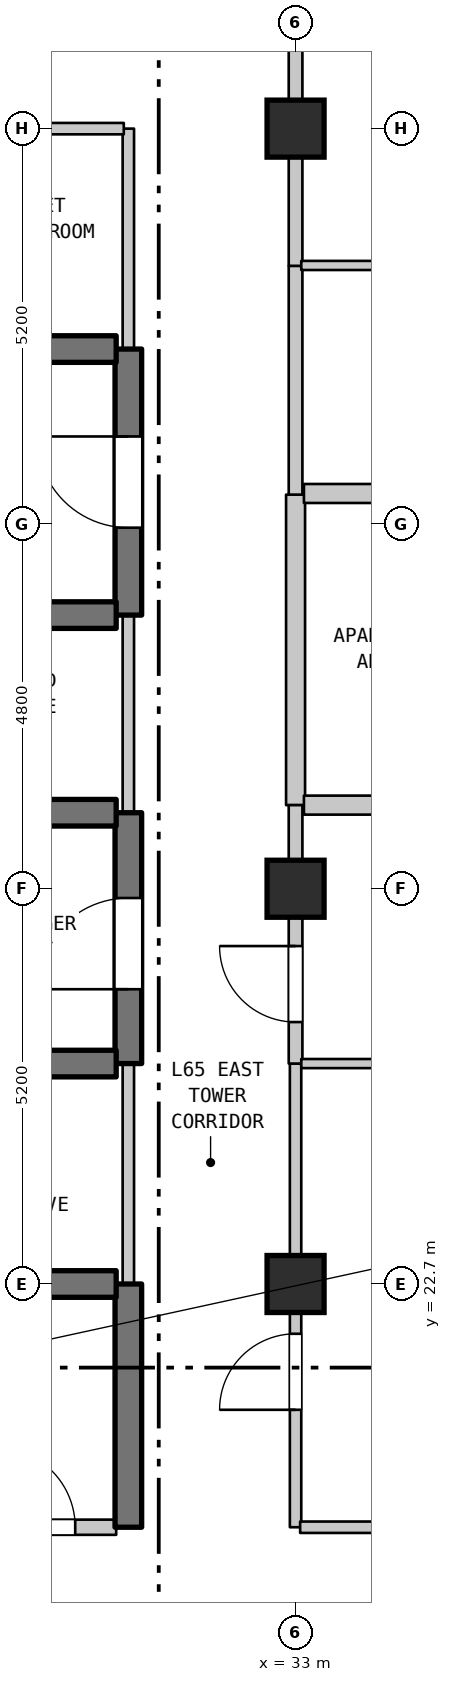
"""IFC4 building model, lengths in metres.
Left out: names, types, materials, properties, quantities, classifications, styles, units other than length and angle.
Written with IfcOpenShell. Run it as: python <this file> out.ifc"""

import sys

from ifc_helpers import new_model, si_unit, direction, frame, frame_2d, origin, origin_2d, place, context, subcontext, project, spatial, rectangle, extrude, element, fill, save


model = new_model("IFC4")
c1 = context("Model", 3, precision=1e-05, world=origin(), true_north=direction((0.0, 1.0)))
c2 = subcontext(c1, "Body", "Model", "MODEL_VIEW")
j1 = project(units=[si_unit("LENGTHUNIT", "METRE"), si_unit("PLANEANGLEUNIT", "RADIAN")], contexts=[c1])
p1 = place(None, origin())
s1 = spatial("IfcSite", under=j1, at=p1, CompositionType="ELEMENT")
p2 = place(p1, origin())
s2 = spatial("IfcBuilding", under=s1, at=p2, CompositionType="ELEMENT")
p3 = place(p2, frame((0.0, 0.0, 262.1)))
s3 = spatial("IfcBuildingStorey", under=s2, at=p3, CompositionType="ELEMENT", Elevation=262.1)
for number, where, z_axis, x_axis in (
    (1, (33.0, 22.7, 0.0), (0.0, 0.0, 1.0), (1.0, 0.0, 0.0)),
    (2, (33.0, 27.9, 0.0), (0.0, 0.0, 1.0), (1.0, 0.0, 0.0)),
    (3, (33.0, 37.9, 0.0), (0.0, 0.0, 1.0), (1.0, 0.0, 0.0)),
):
    element("IfcColumn", number, at=place(p3, frame(where, z_axis=z_axis, x_axis=x_axis)), inside=s3, PredefinedType="COLUMN", context=c2, shape_type="SweptSolid", body=[
        extrude(rectangle(XDim=0.75, YDim=0.75, at=origin_2d()), origin(), (0.0, 0.0, 1.0), 3.7),
    ])
p4 = place(p3, frame((30.8, 19.5, 0.0), z_axis=(0.0, 0.0, 1.0), x_axis=(0.0, 1.0, 0.0)))
e4 = element("IfcWall", 4, at=p4, inside=s3, PredefinedType="SHEAR", context=c2, shape_type="SweptSolid", body=[
    extrude(rectangle(XDim=3.2, YDim=0.35, at=frame_2d((1.6, 0.0))), origin(), (0.0, 0.0, 1.0), 3.39),
])
p5 = place(p3, frame((30.8, 22.7, 0.0), z_axis=(0.0, 0.0, 1.0), x_axis=(0.0, 1.0, 0.0)))
e5 = element("IfcWall", 5, at=p5, inside=s3, PredefinedType="STANDARD", context=c2, shape_type="SweptSolid", body=[
    extrude(rectangle(XDim=2.9, YDim=0.15, at=frame_2d((1.45, 0.0))), origin(), (0.0, 0.0, 1.0), 3.39),
])
p6 = place(p3, frame((30.8, 25.6, 0.0), z_axis=(0.0, 0.0, 1.0), x_axis=(0.0, 1.0, 0.0)))
e6 = element("IfcWall", 6, at=p6, inside=s3, PredefinedType="SHEAR", context=c2, shape_type="SweptSolid", body=[
    extrude(rectangle(XDim=3.3, YDim=0.35, at=frame_2d((1.65, 0.0))), origin(), (0.0, 0.0, 1.0), 3.39),
])
p7 = place(p6, frame((0.978, 0.0, 0.0)))
e7 = element("IfcOpeningElement", 7, at=p7, cuts=e6, PredefinedType="OPENING", context=c2, shape_type="SweptSolid", body=[
    extrude(rectangle(XDim=1.2, YDim=2.2, at=frame_2d((0.6, 1.1))), frame((0.0, 0.185, 0.0), z_axis=(0.0, -1.0, 0.0), x_axis=(1.0, 0.0, 0.0)), (0.0, 0.0, 1.0), 0.37),
])
p8 = place(p3, frame((30.8, 28.9, 0.0), z_axis=(0.0, 0.0, 1.0), x_axis=(0.0, 1.0, 0.0)))
e8 = element("IfcWall", 8, at=p8, inside=s3, PredefinedType="STANDARD", context=c2, shape_type="SweptSolid", body=[
    extrude(rectangle(XDim=2.6, YDim=0.15, at=frame_2d((1.3, 0.0))), origin(), (0.0, 0.0, 1.0), 3.39),
])
p9 = place(p3, frame((30.8, 31.5, 0.0), z_axis=(0.0, 0.0, 1.0), x_axis=(0.0, 1.0, 0.0)))
e9 = element("IfcWall", 9, at=p9, inside=s3, PredefinedType="SHEAR", context=c2, shape_type="SweptSolid", body=[
    extrude(rectangle(XDim=3.5, YDim=0.35, at=frame_2d((1.75, 0.0))), origin(), (0.0, 0.0, 1.0), 3.39),
])
p10 = place(p9, frame((1.15, 0.0, 0.0)))
e10 = element("IfcOpeningElement", 10, at=p10, cuts=e9, PredefinedType="OPENING", context=c2, shape_type="SweptSolid", body=[
    extrude(rectangle(XDim=1.2, YDim=2.2, at=frame_2d((0.6, 1.1))), frame((0.0, 0.185, 0.0), z_axis=(0.0, -1.0, 0.0), x_axis=(1.0, 0.0, 0.0)), (0.0, 0.0, 1.0), 0.37),
])
p11 = place(p3, frame((30.8, 35.0, 0.0), z_axis=(0.0, 0.0, 1.0), x_axis=(0.0, 1.0, 0.0)))
e11 = element("IfcWall", 11, at=p11, inside=s3, PredefinedType="STANDARD", context=c2, shape_type="SweptSolid", body=[
    extrude(rectangle(XDim=2.9, YDim=0.15, at=frame_2d((1.45, 0.0))), origin(), (0.0, 0.0, 1.0), 3.39),
])
p12 = place(p3, frame((33.0, 19.5, 0.0), z_axis=(0.0, 0.0, 1.0), x_axis=(0.0, 1.0, 0.0)))
e12 = element("IfcWall", 12, at=p12, inside=s3, PredefinedType="STANDARD", context=c2, shape_type="SweptSolid", body=[
    extrude(rectangle(XDim=6.1, YDim=0.15, at=frame_2d((3.05, 0.0))), origin(), (0.0, 0.0, 1.0), 3.1),
])
p13 = place(p12, frame((1.545, 0.0, 0.0)))
e13 = element("IfcOpeningElement", 13, at=p13, cuts=e12, PredefinedType="OPENING", context=c2, shape_type="SweptSolid", body=[
    extrude(rectangle(XDim=1.0, YDim=2.15, at=frame_2d((0.5, 1.075))), frame((0.0, 0.085, 0.0), z_axis=(0.0, -1.0, 0.0), x_axis=(1.0, 0.0, 0.0)), (0.0, 0.0, 1.0), 0.17),
])
p14 = place(p3, frame((33.0, 25.6, 0.0), z_axis=(0.0, 0.0, 1.0), x_axis=(0.0, 1.0, 0.0)))
e14 = element("IfcWall", 14, at=p14, inside=s3, PredefinedType="STANDARD", context=c2, shape_type="SweptSolid", body=[
    extrude(rectangle(XDim=2.3, YDim=0.18, at=frame_2d((1.15, 0.0))), origin(), (0.0, 0.0, 1.0), 3.1),
])
p15 = place(p14, frame((0.546, 0.0, 0.0)))
e15 = element("IfcOpeningElement", 15, at=p15, cuts=e14, PredefinedType="OPENING", context=c2, shape_type="SweptSolid", body=[
    extrude(rectangle(XDim=1.0, YDim=2.15, at=frame_2d((0.5, 1.075))), frame((0.0, 0.1, 0.0), z_axis=(0.0, -1.0, 0.0), x_axis=(1.0, 0.0, 0.0)), (0.0, 0.0, 1.0), 0.2),
])
p16 = place(p3, frame((33.0, 29.0, 0.0), z_axis=(0.0, 0.0, 1.0), x_axis=(0.0, 1.0, 0.0)))
e16 = element("IfcWall", 16, at=p16, inside=s3, PredefinedType="STANDARD", context=c2, shape_type="SweptSolid", body=[
    extrude(rectangle(XDim=4.085, YDim=0.25, at=frame_2d((2.042, 0.0))), origin(), (0.0, 0.0, 1.0), 2.89),
])
p17 = place(p3, frame((33.0, 33.085, 0.0), z_axis=(0.0, 0.0, 1.0), x_axis=(0.0, 1.0, 0.0)))
e17 = element("IfcWall", 17, at=p17, inside=s3, PredefinedType="STANDARD", context=c2, shape_type="SweptSolid", body=[
    extrude(rectangle(XDim=3.01, YDim=0.18, at=frame_2d((1.505, 0.0))), origin(), (0.0, 0.0, 1.0), 2.89),
])
p18 = place(p3, frame((33.0, 36.095, 0.0), z_axis=(0.0, 0.0, 1.0), x_axis=(0.0, 1.0, 0.0)))
e18 = element("IfcWall", 18, at=p18, inside=s3, PredefinedType="STANDARD", context=c2, shape_type="SweptSolid", body=[
    extrude(rectangle(XDim=1.805, YDim=0.18, at=frame_2d((0.902, 0.0))), origin(), (0.0, 0.0, 1.0), 2.89),
])
p19 = place(p3, frame((28.585, 19.5, 0.0), z_axis=(0.0, 0.0, 1.0), x_axis=(1.0, 0.0, 0.0)))
e19 = element("IfcWall", 19, at=p19, inside=s3, PredefinedType="STANDARD", context=c2, shape_type="SweptSolid", body=[
    extrude(rectangle(XDim=2.055, YDim=0.2, at=frame_2d((1.027, 0.0))), origin(), (0.0, 0.0, 1.0), 3.39),
])
p20 = place(p19, frame((0.466, 0.0, 0.0)))
e20 = element("IfcOpeningElement", 20, at=p20, cuts=e19, PredefinedType="OPENING", context=c2, shape_type="SweptSolid", body=[
    extrude(rectangle(XDim=1.05, YDim=2.15, at=frame_2d((0.525, 1.075))), frame((0.0, 0.11, 0.0), z_axis=(0.0, -1.0, 0.0), x_axis=(1.0, 0.0, 0.0)), (0.0, 0.0, 1.0), 0.22),
])
p21 = place(p3, frame((33.06, 19.5, 0.0), z_axis=(0.0, 0.0, 1.0), x_axis=(1.0, 0.0, 0.0)))
e21 = element("IfcWall", 21, at=p21, inside=s3, PredefinedType="STANDARD", context=c2, shape_type="SweptSolid", body=[
    extrude(rectangle(XDim=8.323, YDim=0.15, at=frame_2d((4.162, 0.0))), origin(), (0.0, 0.0, 1.0), 3.39),
])
p22 = place(p21, frame((3.583, 0.0, 0.0)))
e22 = element("IfcOpeningElement", 22, at=p22, cuts=e21, PredefinedType="OPENING", context=c2, shape_type="SweptSolid", body=[
    extrude(rectangle(XDim=1.0, YDim=2.15, at=frame_2d((0.5, 1.075))), frame((0.0, 0.085, 0.0), z_axis=(0.0, -1.0, 0.0), x_axis=(1.0, 0.0, 0.0)), (0.0, 0.0, 1.0), 0.17),
])
p23 = place(p3, frame((28.585, 22.7, 0.0), z_axis=(0.0, 0.0, 1.0), x_axis=(1.0, 0.0, 0.0)))
e23 = element("IfcWall", 23, at=p23, inside=s3, PredefinedType="SHEAR", context=c2, shape_type="SweptSolid", body=[
    extrude(rectangle(XDim=2.055, YDim=0.35, at=frame_2d((1.027, 0.0))), origin(), (0.0, 0.0, 1.0), 3.39),
])
p24 = place(p3, frame((27.46, 25.6, 0.0), z_axis=(0.0, 0.0, 1.0), x_axis=(1.0, 0.0, 0.0)))
e24 = element("IfcWall", 24, at=p24, inside=s3, PredefinedType="SHEAR", context=c2, shape_type="SweptSolid", body=[
    extrude(rectangle(XDim=3.18, YDim=0.35, at=frame_2d((1.59, 0.0))), origin(), (0.0, 0.0, 1.0), 3.39),
])
p25 = place(p24, frame((1.115, 0.0, 0.0)))
e25 = element("IfcOpeningElement", 25, at=p25, cuts=e24, PredefinedType="OPENING", context=c2, shape_type="SweptSolid", body=[
    extrude(rectangle(XDim=0.95, YDim=2.15, at=frame_2d((0.475, 1.075))), frame((0.0, 0.185, 0.0), z_axis=(0.0, -1.0, 0.0), x_axis=(1.0, 0.0, 0.0)), (0.0, 0.0, 1.0), 0.37),
])
p26 = place(p3, frame((33.075, 25.6, 0.0), z_axis=(0.0, 0.0, 1.0), x_axis=(1.0, 0.0, 0.0)))
e26 = element("IfcWall", 26, at=p26, inside=s3, PredefinedType="PARTITIONING", context=c2, shape_type="SweptSolid", body=[
    extrude(rectangle(XDim=11.59, YDim=0.12, at=frame_2d((5.795, 0.0))), origin(), (0.0, 0.0, 1.0), 3.39),
])
p27 = place(p3, frame((27.46, 28.9, 0.0), z_axis=(0.0, 0.0, 1.0), x_axis=(1.0, 0.0, 0.0)))
e27 = element("IfcWall", 27, at=p27, inside=s3, PredefinedType="SHEAR", context=c2, shape_type="SweptSolid", body=[
    extrude(rectangle(XDim=3.18, YDim=0.35, at=frame_2d((1.59, 0.0))), origin(), (0.0, 0.0, 1.0), 3.39),
])
p28 = place(p27, frame((1.115, 0.0, 0.0)))
e28 = element("IfcOpeningElement", 28, at=p28, cuts=e27, PredefinedType="OPENING", context=c2, shape_type="SweptSolid", body=[
    extrude(rectangle(XDim=0.95, YDim=2.15, at=frame_2d((0.475, 1.075))), frame((0.0, 0.185, 0.0), z_axis=(0.0, -1.0, 0.0), x_axis=(1.0, 0.0, 0.0)), (0.0, 0.0, 1.0), 0.37),
])
p29 = place(p3, frame((33.11, 29.0, 0.0), z_axis=(0.0, 0.0, 1.0), x_axis=(1.0, 0.0, 0.0)))
e29 = element("IfcWall", 29, at=p29, inside=s3, PredefinedType="STANDARD", context=c2, shape_type="SweptSolid", body=[
    extrude(rectangle(XDim=4.36, YDim=0.25, at=frame_2d((2.18, 0.0))), origin(), (0.0, 0.0, 1.0), 3.39),
])
p30 = place(p3, frame((27.46, 31.5, 0.0), z_axis=(0.0, 0.0, 1.0), x_axis=(1.0, 0.0, 0.0)))
e30 = element("IfcWall", 30, at=p30, inside=s3, PredefinedType="SHEAR", context=c2, shape_type="SweptSolid", body=[
    extrude(rectangle(XDim=3.18, YDim=0.35, at=frame_2d((1.59, 0.0))), origin(), (0.0, 0.0, 1.0), 3.39),
])
p31 = place(p3, frame((33.11, 33.1, 0.0), z_axis=(0.0, 0.0, 1.0), x_axis=(1.0, 0.0, 0.0)))
e31 = element("IfcWall", 31, at=p31, inside=s3, PredefinedType="STANDARD", context=c2, shape_type="SweptSolid", body=[
    extrude(rectangle(XDim=4.36, YDim=0.25, at=frame_2d((2.18, 0.0))), origin(), (0.0, 0.0, 1.0), 3.39),
])
p32 = place(p3, frame((26.645, 35.0, 0.0), z_axis=(0.0, 0.0, 1.0), x_axis=(1.0, 0.0, 0.0)))
e32 = element("IfcWall", 32, at=p32, inside=s3, PredefinedType="SHEAR", context=c2, shape_type="SweptSolid", body=[
    extrude(rectangle(XDim=3.995, YDim=0.35, at=frame_2d((1.998, 0.0))), origin(), (0.0, 0.0, 1.0), 3.39),
])
p33 = place(p32, frame((1.508, 0.0, 0.0)))
e33 = element("IfcOpeningElement", 33, at=p33, cuts=e32, PredefinedType="OPENING", context=c2, shape_type="SweptSolid", body=[
    extrude(rectangle(XDim=0.95, YDim=2.15, at=frame_2d((0.475, 1.075))), frame((0.0, 0.185, 0.0), z_axis=(0.0, -1.0, 0.0), x_axis=(1.0, 0.0, 0.0)), (0.0, 0.0, 1.0), 0.37),
])
p34 = place(p3, frame((33.075, 36.1, 0.0), z_axis=(0.0, 0.0, 1.0), x_axis=(1.0, 0.0, 0.0)))
e34 = element("IfcWall", 34, at=p34, inside=s3, PredefinedType="PARTITIONING", context=c2, shape_type="SweptSolid", body=[
    extrude(rectangle(XDim=4.46, YDim=0.12, at=frame_2d((2.23, 0.0))), origin(), (0.0, 0.0, 1.0), 3.39),
])
p35 = place(p3, frame((26.645, 37.9, 0.0), z_axis=(0.0, 0.0, 1.0), x_axis=(1.0, 0.0, 0.0)))
e35 = element("IfcWall", 35, at=p35, inside=s3, PredefinedType="STANDARD", context=c2, shape_type="SweptSolid", body=[
    extrude(rectangle(XDim=4.095, YDim=0.15, at=frame_2d((2.047, 0.0))), origin(), (0.0, 0.0, 1.0), 2.89),
])
p36 = place(p3, frame((33.0, 27.9, 0.0), z_axis=(0.0, 0.0, 1.0), x_axis=(0.0, 1.0, 0.0)))
e36 = element("IfcWall", 36, at=p36, inside=s3, PredefinedType="STANDARD", context=c2, shape_type="SweptSolid", body=[
    extrude(rectangle(XDim=1.1, YDim=0.18, at=frame_2d((0.55, 0.0))), origin(), (0.0, 0.0, 1.0), 2.89),
])
p37 = place(p3, frame((33.0, 37.9, 0.0), z_axis=(0.0, 0.0, 1.0), x_axis=(0.0, 1.0, 0.0)))
e37 = element("IfcWall", 37, at=p37, inside=s3, PredefinedType="STANDARD", context=c2, shape_type="SweptSolid", body=[
    extrude(rectangle(XDim=1.85, YDim=0.18, at=frame_2d((0.925, 0.0))), origin(), (0.0, 0.0, 1.0), 2.79),
])
p38 = place(p7, origin())
e38 = element("IfcDoor", 38, at=p38, inside=s3, OperationType="SINGLE_SWING_LEFT", PredefinedType="DOOR", context=c2, shape_type="SweptSolid", body=[
    extrude(rectangle(XDim=1.2, YDim=2.2, at=frame_2d((0.6, 1.1))), frame((0.0, 0.025, 0.0), z_axis=(0.0, -1.0, 0.0), x_axis=(1.0, 0.0, 0.0)), (0.0, 0.0, 1.0), 0.05),
])
fill(e7, e38)
p39 = place(p10, origin())
e39 = element("IfcDoor", 39, at=p39, inside=s3, OperationType="SINGLE_SWING_RIGHT", PredefinedType="DOOR", context=c2, shape_type="SweptSolid", body=[
    extrude(rectangle(XDim=1.2, YDim=2.2, at=frame_2d((0.6, 1.1))), frame((0.0, 0.025, 0.0), z_axis=(0.0, -1.0, 0.0), x_axis=(1.0, 0.0, 0.0)), (0.0, 0.0, 1.0), 0.05),
])
fill(e10, e39)
p40 = place(p13, origin())
e40 = element("IfcDoor", 40, at=p40, inside=s3, OperationType="SINGLE_SWING_LEFT", PredefinedType="DOOR", context=c2, shape_type="SweptSolid", body=[
    extrude(rectangle(XDim=1.0, YDim=2.15, at=frame_2d((0.5, 1.075))), frame((0.0, 0.025, 0.0), z_axis=(0.0, -1.0, 0.0), x_axis=(1.0, 0.0, 0.0)), (0.0, 0.0, 1.0), 0.05),
])
fill(e13, e40)
p41 = place(p15, origin())
e41 = element("IfcDoor", 41, at=p41, inside=s3, OperationType="SINGLE_SWING_RIGHT", PredefinedType="DOOR", context=c2, shape_type="SweptSolid", body=[
    extrude(rectangle(XDim=1.0, YDim=2.15, at=frame_2d((0.5, 1.075))), frame((0.0, 0.025, 0.0), z_axis=(0.0, -1.0, 0.0), x_axis=(1.0, 0.0, 0.0)), (0.0, 0.0, 1.0), 0.05),
])
fill(e15, e41)
p42 = place(p20, origin())
e42 = element("IfcDoor", 42, at=p42, inside=s3, OperationType="SINGLE_SWING_LEFT", PredefinedType="DOOR", context=c2, shape_type="SweptSolid", body=[
    extrude(rectangle(XDim=1.05, YDim=2.15, at=frame_2d((0.525, 1.075))), frame((0.0, 0.025, 0.0), z_axis=(0.0, -1.0, 0.0), x_axis=(1.0, 0.0, 0.0)), (0.0, 0.0, 1.0), 0.05),
])
fill(e20, e42)
save(model, sys.argv[1])
